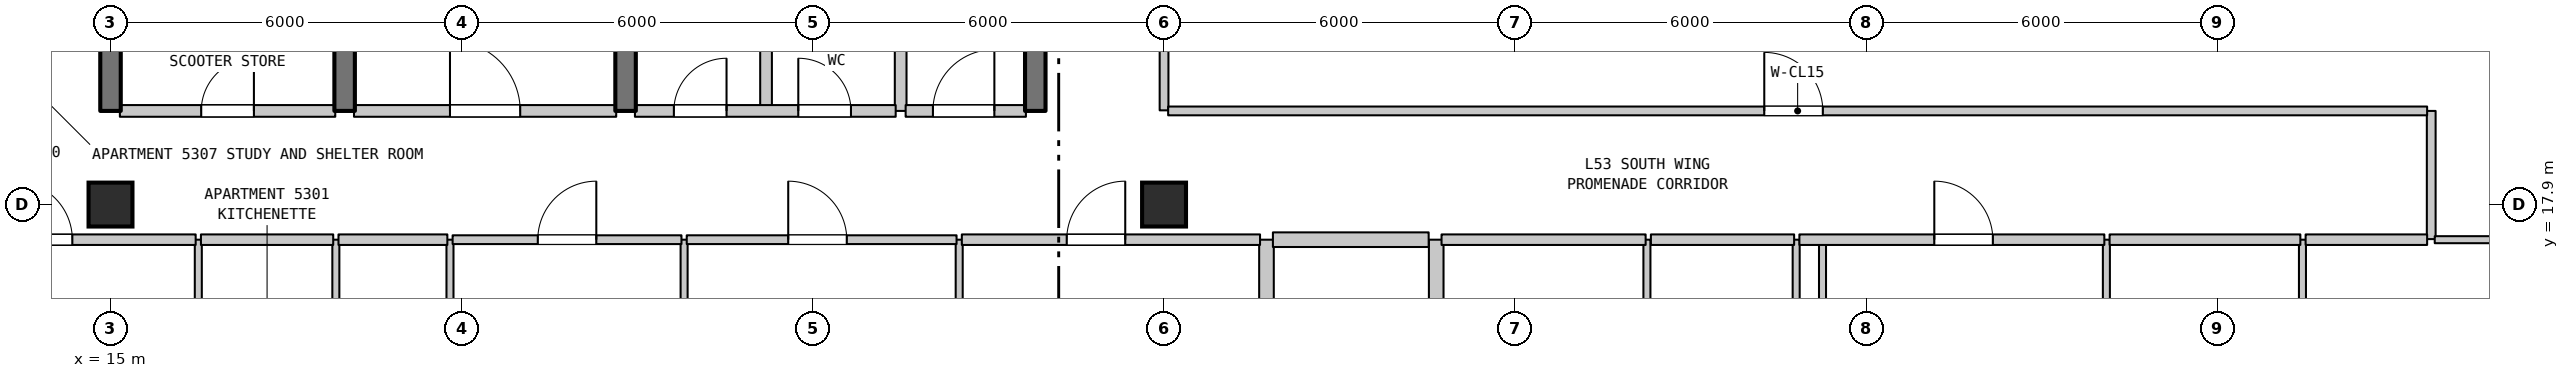
"""IFC4 building model, lengths in metres.
Left out: names, types, materials, properties, quantities, classifications, styles, units other than length and angle.
Written with IfcOpenShell. Run it as: python <this file> out.ifc"""

import sys

from ifc_helpers import new_model, si_unit, direction, frame, frame_2d, origin, origin_2d, place, context, subcontext, project, spatial, rectangle, extrude, element, fill, save


model = new_model("IFC4")
c1 = context("Model", 3, precision=1e-05, world=origin(), true_north=direction((0.0, 1.0)))
c2 = subcontext(c1, "Body", "Model", "MODEL_VIEW")
j1 = project(units=[si_unit("LENGTHUNIT", "METRE"), si_unit("PLANEANGLEUNIT", "RADIAN")], contexts=[c1])
p1 = place(None, origin())
s1 = spatial("IfcSite", under=j1, at=p1, CompositionType="ELEMENT")
p2 = place(p1, origin())
s2 = spatial("IfcBuilding", under=s1, at=p2, CompositionType="ELEMENT")
p3 = place(p2, frame((0.0, 0.0, 214.3)))
s3 = spatial("IfcBuildingStorey", under=s2, at=p3, CompositionType="ELEMENT", Elevation=214.3)
for number, where, z_axis, x_axis in (
    (1, (15.0, 17.9, 0.0), (0.0, 0.0, 1.0), (1.0, 0.0, 0.0)),
    (2, (33.0, 17.9, 0.0), (0.0, 0.0, 1.0), (1.0, 0.0, 0.0)),
):
    element("IfcColumn", number, at=place(p3, frame(where, z_axis=z_axis, x_axis=x_axis)), inside=s3, PredefinedType="COLUMN", context=c2, shape_type="SweptSolid", body=[
        extrude(rectangle(XDim=0.75, YDim=0.75, at=origin_2d()), origin(), (0.0, 0.0, 1.0), 3.7),
    ])
p4 = place(p3, frame((15.0, 19.5, 0.0), z_axis=(0.0, 0.0, 1.0), x_axis=(0.0, 1.0, 0.0)))
e3 = element("IfcWall", 3, at=p4, inside=s3, PredefinedType="SHEAR", context=c2, shape_type="SweptSolid", body=[
    extrude(rectangle(XDim=3.2, YDim=0.35, at=frame_2d((1.6, 0.0))), origin(), (0.0, 0.0, 1.0), 3.38),
])
p5 = place(p3, frame((16.5, 14.1, 0.0), z_axis=(0.0, 0.0, 1.0), x_axis=(0.0, 1.0, 0.0)))
e4 = element("IfcWall", 4, at=p5, inside=s3, PredefinedType="PARTITIONING", context=c2, shape_type="SweptSolid", body=[
    extrude(rectangle(XDim=3.2, YDim=0.12, at=frame_2d((1.6, 0.0))), origin(), (0.0, 0.0, 1.0), 3.38),
])
p6 = place(p5, frame((1.15, 0.0, 0.0)))
e5 = element("IfcOpeningElement", 5, at=p6, cuts=e4, PredefinedType="OPENING", context=c2, shape_type="SweptSolid", body=[
    extrude(rectangle(XDim=0.9, YDim=2.15, at=frame_2d((0.45, 1.075))), frame((0.0, 0.07, 0.0), z_axis=(0.0, -1.0, 0.0), x_axis=(1.0, 0.0, 0.0)), (0.0, 0.0, 1.0), 0.14),
])
p7 = place(p3, frame((18.85, 14.1, 0.0), z_axis=(0.0, 0.0, 1.0), x_axis=(0.0, 1.0, 0.0)))
e6 = element("IfcWall", 6, at=p7, inside=s3, PredefinedType="PARTITIONING", context=c2, shape_type="SweptSolid", body=[
    extrude(rectangle(XDim=3.2, YDim=0.12, at=frame_2d((1.6, 0.0))), origin(), (0.0, 0.0, 1.0), 3.38),
])
p8 = place(p3, frame((19.0, 19.5, 0.0), z_axis=(0.0, 0.0, 1.0), x_axis=(0.0, 1.0, 0.0)))
e7 = element("IfcWall", 7, at=p8, inside=s3, PredefinedType="SHEAR", context=c2, shape_type="SweptSolid", body=[
    extrude(rectangle(XDim=3.2, YDim=0.35, at=frame_2d((1.6, 0.0))), origin(), (0.0, 0.0, 1.0), 3.38),
])
p9 = place(p3, frame((20.8, 6.888, 0.0), z_axis=(0.0, 0.0, 1.0), x_axis=(0.0, 1.0, 0.0)))
e8 = element("IfcWall", 8, at=p9, inside=s3, PredefinedType="PARTITIONING", context=c2, shape_type="SweptSolid", body=[
    extrude(rectangle(XDim=10.412, YDim=0.12, at=frame_2d((5.206, 0.0))), origin(), (0.0, 0.0, 1.0), 3.38),
])
p10 = place(p3, frame((23.8, 19.5, 0.0), z_axis=(0.0, 0.0, 1.0), x_axis=(0.0, 1.0, 0.0)))
e9 = element("IfcWall", 9, at=p10, inside=s3, PredefinedType="SHEAR", context=c2, shape_type="SweptSolid", body=[
    extrude(rectangle(XDim=3.2, YDim=0.35, at=frame_2d((1.6, 0.0))), origin(), (0.0, 0.0, 1.0), 3.38),
])
p11 = place(p3, frame((24.8, 0.71, 0.0), z_axis=(0.0, 0.0, 1.0), x_axis=(0.0, 1.0, 0.0)))
e10 = element("IfcWall", 10, at=p11, inside=s3, PredefinedType="PARTITIONING", context=c2, shape_type="SweptSolid", body=[
    extrude(rectangle(XDim=16.59, YDim=0.12, at=frame_2d((8.295, 0.0))), origin(), (0.0, 0.0, 1.0), 3.38),
])
for number, where, z_axis, x_axis in (
    (11, (26.2, 19.5, 0.0), (0.0, 0.0, 1.0), (0.0, 1.0, 0.0)),
    (12, (28.5, 19.5, 0.0), (0.0, 0.0, 1.0), (0.0, 1.0, 0.0)),
):
    element("IfcWall", number, at=place(p3, frame(where, z_axis=z_axis, x_axis=x_axis)), inside=s3, PredefinedType="STANDARD", context=c2, shape_type="SweptSolid", body=[
        extrude(rectangle(XDim=3.2, YDim=0.2, at=frame_2d((1.6, 0.0))), origin(), (0.0, 0.0, 1.0), 3.38),
    ])
p12 = place(p3, frame((29.5, 14.85, 0.0), z_axis=(0.0, 0.0, 1.0), x_axis=(0.0, 1.0, 0.0)))
e13 = element("IfcWall", 13, at=p12, inside=s3, PredefinedType="PARTITIONING", context=c2, shape_type="SweptSolid", body=[
    extrude(rectangle(XDim=2.45, YDim=0.12, at=frame_2d((1.225, 0.0))), origin(), (0.0, 0.0, 1.0), 3.38),
])
p13 = place(p3, frame((30.8, 19.5, 0.0), z_axis=(0.0, 0.0, 1.0), x_axis=(0.0, 1.0, 0.0)))
e14 = element("IfcWall", 14, at=p13, inside=s3, PredefinedType="SHEAR", context=c2, shape_type="SweptSolid", body=[
    extrude(rectangle(XDim=3.2, YDim=0.35, at=frame_2d((1.6, 0.0))), origin(), (0.0, 0.0, 1.0), 3.38),
])
p14 = place(p3, frame((33.0, 19.51, 0.0), z_axis=(0.0, 0.0, 1.0), x_axis=(0.0, 1.0, 0.0)))
e15 = element("IfcWall", 15, at=p14, inside=s3, PredefinedType="STANDARD", context=c2, shape_type="SweptSolid", body=[
    extrude(rectangle(XDim=3.66, YDim=0.15, at=frame_2d((1.83, 0.0))), origin(), (0.0, 0.0, 1.0), 2.98),
])
p15 = place(p14, frame((1.258, 0.0, 0.0)))
e16 = element("IfcOpeningElement", 16, at=p15, cuts=e15, PredefinedType="OPENING", context=c2, shape_type="SweptSolid", body=[
    extrude(rectangle(XDim=1.0, YDim=2.15, at=frame_2d((0.5, 1.075))), frame((0.0, 0.085, 0.0), z_axis=(0.0, -1.0, 0.0), x_axis=(1.0, 0.0, 0.0)), (0.0, 0.0, 1.0), 0.17),
])
for number, where, z_axis, x_axis in (
    (17, (34.75, 11.15, 0.0), (0.0, 0.0, 1.0), (0.0, 1.0, 0.0)),
    (18, (37.65, 11.15, 0.0), (0.0, 0.0, 1.0), (0.0, 1.0, 0.0)),
):
    element("IfcWall", number, at=place(p3, frame(where, z_axis=z_axis, x_axis=x_axis)), inside=s3, PredefinedType="STANDARD", context=c2, shape_type="SweptSolid", body=[
        extrude(rectangle(XDim=6.15, YDim=0.25, at=frame_2d((3.075, 0.0))), origin(), (0.0, 0.0, 1.0), 3.38),
    ])
for number, where, z_axis, x_axis in (
    (19, (41.25, 11.15, 0.0), (0.0, 0.0, 1.0), (0.0, 1.0, 0.0)),
    (20, (43.8, 11.15, 0.0), (0.0, 0.0, 1.0), (0.0, 1.0, 0.0)),
):
    element("IfcWall", number, at=place(p3, frame(where, z_axis=z_axis, x_axis=x_axis)), inside=s3, PredefinedType="PARTITIONING", context=c2, shape_type="SweptSolid", body=[
        extrude(rectangle(XDim=6.15, YDim=0.12, at=frame_2d((3.075, 0.0))), origin(), (0.0, 0.0, 1.0), 3.38),
    ])
p16 = place(p3, frame((44.25, 14.85, 0.0), z_axis=(0.0, 0.0, 1.0), x_axis=(0.0, 1.0, 0.0)))
e21 = element("IfcWall", 21, at=p16, inside=s3, PredefinedType="PARTITIONING", context=c2, shape_type="SweptSolid", body=[
    extrude(rectangle(XDim=2.45, YDim=0.12, at=frame_2d((1.225, 0.0))), origin(), (0.0, 0.0, 1.0), 3.38),
])
for number, where, z_axis, x_axis in (
    (22, (49.1, 11.15, 0.0), (0.0, 0.0, 1.0), (0.0, 1.0, 0.0)),
    (23, (52.45, 11.15, 0.0), (0.0, 0.0, 1.0), (0.0, 1.0, 0.0)),
):
    element("IfcWall", number, at=place(p3, frame(where, z_axis=z_axis, x_axis=x_axis)), inside=s3, PredefinedType="PARTITIONING", context=c2, shape_type="SweptSolid", body=[
        extrude(rectangle(XDim=6.15, YDim=0.12, at=frame_2d((3.075, 0.0))), origin(), (0.0, 0.0, 1.0), 3.38),
    ])
p17 = place(p3, frame((54.65, 17.31, 0.0), z_axis=(0.0, 0.0, 1.0), x_axis=(0.0, 1.0, 0.0)))
e24 = element("IfcWall", 24, at=p17, inside=s3, PredefinedType="STANDARD", context=c2, shape_type="SweptSolid", body=[
    extrude(rectangle(XDim=2.19, YDim=0.15, at=frame_2d((1.095, 0.0))), origin(), (0.0, 0.0, 1.0), 3.38),
])
p18 = place(p3, frame((12.875, 17.3, 0.0), z_axis=(0.0, 0.0, 1.0), x_axis=(1.0, 0.0, 0.0)))
e25 = element("IfcWall", 25, at=p18, inside=s3, PredefinedType="STANDARD", context=c2, shape_type="SweptSolid", body=[
    extrude(rectangle(XDim=3.58, YDim=0.18, at=frame_2d((1.79, 0.0))), origin(), (0.0, 0.0, 1.0), 3.38),
])
p19 = place(p18, frame((0.473, 0.0, 0.0)))
e26 = element("IfcOpeningElement", 26, at=p19, cuts=e25, PredefinedType="OPENING", context=c2, shape_type="SweptSolid", body=[
    extrude(rectangle(XDim=1.0, YDim=2.15, at=frame_2d((0.5, 1.075))), frame((0.0, 0.1, 0.0), z_axis=(0.0, -1.0, 0.0), x_axis=(1.0, 0.0, 0.0)), (0.0, 0.0, 1.0), 0.2),
])
p20 = place(p3, frame((16.545, 17.3, 0.0), z_axis=(0.0, 0.0, 1.0), x_axis=(1.0, 0.0, 0.0)))
e27 = element("IfcWall", 27, at=p20, inside=s3, PredefinedType="STANDARD", context=c2, shape_type="SweptSolid", body=[
    extrude(rectangle(XDim=2.26, YDim=0.18, at=frame_2d((1.13, 0.0))), origin(), (0.0, 0.0, 1.0), 3.38),
])
p21 = place(p3, frame((18.895, 17.3, 0.0), z_axis=(0.0, 0.0, 1.0), x_axis=(1.0, 0.0, 0.0)))
e28 = element("IfcWall", 28, at=p21, inside=s3, PredefinedType="STANDARD", context=c2, shape_type="SweptSolid", body=[
    extrude(rectangle(XDim=1.86, YDim=0.18, at=frame_2d((0.93, 0.0))), origin(), (0.0, 0.0, 1.0), 3.38),
])
p22 = place(p3, frame((20.845, 17.3, 0.0), z_axis=(0.0, 0.0, 1.0), x_axis=(1.0, 0.0, 0.0)))
e29 = element("IfcWall", 29, at=p22, inside=s3, PredefinedType="STANDARD", context=c2, shape_type="SweptSolid", body=[
    extrude(rectangle(XDim=3.91, YDim=0.15, at=frame_2d((1.955, 0.0))), origin(), (0.0, 0.0, 1.0), 3.38),
])
p23 = place(p22, frame((1.455, 0.0, 0.0)))
e30 = element("IfcOpeningElement", 30, at=p23, cuts=e29, PredefinedType="OPENING", context=c2, shape_type="SweptSolid", body=[
    extrude(rectangle(XDim=1.0, YDim=2.15, at=frame_2d((0.5, 1.075))), frame((0.0, 0.085, 0.0), z_axis=(0.0, -1.0, 0.0), x_axis=(1.0, 0.0, 0.0)), (0.0, 0.0, 1.0), 0.17),
])
p24 = place(p3, frame((24.845, 17.3, 0.0), z_axis=(0.0, 0.0, 1.0), x_axis=(1.0, 0.0, 0.0)))
e31 = element("IfcWall", 31, at=p24, inside=s3, PredefinedType="STANDARD", context=c2, shape_type="SweptSolid", body=[
    extrude(rectangle(XDim=4.61, YDim=0.15, at=frame_2d((2.305, 0.0))), origin(), (0.0, 0.0, 1.0), 3.38),
])
p25 = place(p24, frame((1.734, 0.0, 0.0)))
e32 = element("IfcOpeningElement", 32, at=p25, cuts=e31, PredefinedType="OPENING", context=c2, shape_type="SweptSolid", body=[
    extrude(rectangle(XDim=1.0, YDim=2.15, at=frame_2d((0.5, 1.075))), frame((0.0, 0.085, 0.0), z_axis=(0.0, -1.0, 0.0), x_axis=(1.0, 0.0, 0.0)), (0.0, 0.0, 1.0), 0.17),
])
p26 = place(p3, frame((29.545, 17.3, 0.0), z_axis=(0.0, 0.0, 1.0), x_axis=(1.0, 0.0, 0.0)))
e33 = element("IfcWall", 33, at=p26, inside=s3, PredefinedType="STANDARD", context=c2, shape_type="SweptSolid", body=[
    extrude(rectangle(XDim=5.095, YDim=0.18, at=frame_2d((2.547, 0.0))), origin(), (0.0, 0.0, 1.0), 3.38),
])
p27 = place(p26, frame((1.792, 0.0, 0.0)))
e34 = element("IfcOpeningElement", 34, at=p27, cuts=e33, PredefinedType="OPENING", context=c2, shape_type="SweptSolid", body=[
    extrude(rectangle(XDim=1.0, YDim=2.15, at=frame_2d((0.5, 1.075))), frame((0.0, 0.1, 0.0), z_axis=(0.0, -1.0, 0.0), x_axis=(1.0, 0.0, 0.0)), (0.0, 0.0, 1.0), 0.2),
])
p28 = place(p3, frame((34.86, 17.3, 0.0), z_axis=(0.0, 0.0, 1.0), x_axis=(1.0, 0.0, 0.0)))
e35 = element("IfcWall", 35, at=p28, inside=s3, PredefinedType="STANDARD", context=c2, shape_type="SweptSolid", body=[
    extrude(rectangle(XDim=2.661, YDim=0.25, at=frame_2d((1.331, 0.0))), origin(), (0.0, 0.0, 1.0), 3.38),
])
p29 = place(p3, frame((37.741, 17.3, 0.0), z_axis=(0.0, 0.0, 1.0), x_axis=(1.0, 0.0, 0.0)))
e36 = element("IfcWall", 36, at=p29, inside=s3, PredefinedType="STANDARD", context=c2, shape_type="SweptSolid", body=[
    extrude(rectangle(XDim=3.487, YDim=0.18, at=frame_2d((1.744, 0.0))), origin(), (0.0, 0.0, 1.0), 3.38),
])
p30 = place(p3, frame((41.318, 17.3, 0.0), z_axis=(0.0, 0.0, 1.0), x_axis=(1.0, 0.0, 0.0)))
e37 = element("IfcWall", 37, at=p30, inside=s3, PredefinedType="STANDARD", context=c2, shape_type="SweptSolid", body=[
    extrude(rectangle(XDim=2.447, YDim=0.18, at=frame_2d((1.223, 0.0))), origin(), (0.0, 0.0, 1.0), 3.38),
])
p31 = place(p3, frame((43.855, 17.3, 0.0), z_axis=(0.0, 0.0, 1.0), x_axis=(1.0, 0.0, 0.0)))
e38 = element("IfcWall", 38, at=p31, inside=s3, PredefinedType="STANDARD", context=c2, shape_type="SweptSolid", body=[
    extrude(rectangle(XDim=5.21, YDim=0.18, at=frame_2d((2.605, 0.0))), origin(), (0.0, 0.0, 1.0), 3.38),
])
p32 = place(p31, frame((2.305, 0.0, 0.0)))
e39 = element("IfcOpeningElement", 39, at=p32, cuts=e38, PredefinedType="OPENING", context=c2, shape_type="SweptSolid", body=[
    extrude(rectangle(XDim=1.0, YDim=2.15, at=frame_2d((0.5, 1.075))), frame((0.0, 0.1, 0.0), z_axis=(0.0, -1.0, 0.0), x_axis=(1.0, 0.0, 0.0)), (0.0, 0.0, 1.0), 0.2),
])
p33 = place(p3, frame((49.155, 17.3, 0.0), z_axis=(0.0, 0.0, 1.0), x_axis=(1.0, 0.0, 0.0)))
e40 = element("IfcWall", 40, at=p33, inside=s3, PredefinedType="STANDARD", context=c2, shape_type="SweptSolid", body=[
    extrude(rectangle(XDim=3.259, YDim=0.18, at=frame_2d((1.629, 0.0))), origin(), (0.0, 0.0, 1.0), 3.38),
])
p34 = place(p3, frame((52.504, 17.3, 0.0), z_axis=(0.0, 0.0, 1.0), x_axis=(1.0, 0.0, 0.0)))
e41 = element("IfcWall", 41, at=p34, inside=s3, PredefinedType="STANDARD", context=c2, shape_type="SweptSolid", body=[
    extrude(rectangle(XDim=2.076, YDim=0.18, at=frame_2d((1.038, 0.0))), origin(), (0.0, 0.0, 1.0), 3.38),
])
p35 = place(p3, frame((54.71, 17.3, 0.0), z_axis=(0.0, 0.0, 1.0), x_axis=(1.0, 0.0, 0.0)))
e42 = element("IfcWall", 42, at=p35, inside=s3, PredefinedType="PARTITIONING", context=c2, shape_type="SweptSolid", body=[
    extrude(rectangle(XDim=1.635, YDim=0.12, at=frame_2d((0.817, 0.0))), origin(), (0.0, 0.0, 1.0), 3.38),
])
p36 = place(p3, frame((15.16, 19.5, 0.0), z_axis=(0.0, 0.0, 1.0), x_axis=(1.0, 0.0, 0.0)))
e43 = element("IfcWall", 43, at=p36, inside=s3, PredefinedType="STANDARD", context=c2, shape_type="SweptSolid", body=[
    extrude(rectangle(XDim=3.68, YDim=0.2, at=frame_2d((1.84, 0.0))), origin(), (0.0, 0.0, 1.0), 3.38),
])
p37 = place(p36, frame((1.39, 0.0, 0.0)))
e44 = element("IfcOpeningElement", 44, at=p37, cuts=e43, PredefinedType="OPENING", context=c2, shape_type="SweptSolid", body=[
    extrude(rectangle(XDim=0.9, YDim=2.15, at=frame_2d((0.45, 1.075))), frame((0.0, 0.11, 0.0), z_axis=(0.0, -1.0, 0.0), x_axis=(1.0, 0.0, 0.0)), (0.0, 0.0, 1.0), 0.22),
])
p38 = place(p3, frame((19.16, 19.5, 0.0), z_axis=(0.0, 0.0, 1.0), x_axis=(1.0, 0.0, 0.0)))
e45 = element("IfcWall", 45, at=p38, inside=s3, PredefinedType="STANDARD", context=c2, shape_type="SweptSolid", body=[
    extrude(rectangle(XDim=4.48, YDim=0.2, at=frame_2d((2.24, 0.0))), origin(), (0.0, 0.0, 1.0), 3.38),
])
p39 = place(p38, frame((1.64, 0.0, 0.0)))
e46 = element("IfcOpeningElement", 46, at=p39, cuts=e45, PredefinedType="OPENING", context=c2, shape_type="SweptSolid", body=[
    extrude(rectangle(XDim=1.2, YDim=2.2, at=frame_2d((0.6, 1.1))), frame((0.0, 0.11, 0.0), z_axis=(0.0, -1.0, 0.0), x_axis=(1.0, 0.0, 0.0)), (0.0, 0.0, 1.0), 0.22),
])
p40 = place(p3, frame((23.96, 19.5, 0.0), z_axis=(0.0, 0.0, 1.0), x_axis=(1.0, 0.0, 0.0)))
e47 = element("IfcWall", 47, at=p40, inside=s3, PredefinedType="STANDARD", context=c2, shape_type="SweptSolid", body=[
    extrude(rectangle(XDim=4.455, YDim=0.2, at=frame_2d((2.228, 0.0))), origin(), (0.0, 0.0, 1.0), 3.38),
])
p41 = place(p40, frame((0.665, 0.0, 0.0)))
e48 = element("IfcOpeningElement", 48, at=p41, cuts=e47, PredefinedType="OPENING", context=c2, shape_type="SweptSolid", body=[
    extrude(rectangle(XDim=0.9, YDim=2.15, at=frame_2d((0.45, 1.075))), frame((0.0, 0.11, 0.0), z_axis=(0.0, -1.0, 0.0), x_axis=(1.0, 0.0, 0.0)), (0.0, 0.0, 1.0), 0.22),
])
p42 = place(p40, frame((2.791, 0.0, 0.0)))
e49 = element("IfcOpeningElement", 49, at=p42, cuts=e47, PredefinedType="OPENING", context=c2, shape_type="SweptSolid", body=[
    extrude(rectangle(XDim=0.9, YDim=2.15, at=frame_2d((0.45, 1.075))), frame((0.0, 0.11, 0.0), z_axis=(0.0, -1.0, 0.0), x_axis=(1.0, 0.0, 0.0)), (0.0, 0.0, 1.0), 0.22),
])
p43 = place(p3, frame((28.585, 19.5, 0.0), z_axis=(0.0, 0.0, 1.0), x_axis=(1.0, 0.0, 0.0)))
e50 = element("IfcWall", 50, at=p43, inside=s3, PredefinedType="STANDARD", context=c2, shape_type="SweptSolid", body=[
    extrude(rectangle(XDim=2.055, YDim=0.2, at=frame_2d((1.027, 0.0))), origin(), (0.0, 0.0, 1.0), 3.38),
])
p44 = place(p43, frame((0.466, 0.0, 0.0)))
e51 = element("IfcOpeningElement", 51, at=p44, cuts=e50, PredefinedType="OPENING", context=c2, shape_type="SweptSolid", body=[
    extrude(rectangle(XDim=1.05, YDim=2.15, at=frame_2d((0.525, 1.075))), frame((0.0, 0.11, 0.0), z_axis=(0.0, -1.0, 0.0), x_axis=(1.0, 0.0, 0.0)), (0.0, 0.0, 1.0), 0.22),
])
p45 = place(p3, frame((33.07, 19.5, 0.0), z_axis=(0.0, 0.0, 1.0), x_axis=(1.0, 0.0, 0.0)))
e52 = element("IfcWall", 52, at=p45, inside=s3, PredefinedType="STANDARD", context=c2, shape_type="SweptSolid", body=[
    extrude(rectangle(XDim=21.51, YDim=0.15, at=frame_2d((10.755, 0.0))), origin(), (0.0, 0.0, 1.0), 3.38),
])
p46 = place(p45, frame((10.185, 0.0, 0.0)))
e53 = element("IfcOpeningElement", 53, at=p46, cuts=e52, PredefinedType="OPENING", context=c2, shape_type="SweptSolid", body=[
    extrude(rectangle(XDim=1.0, YDim=2.15, at=frame_2d((0.5, 1.075))), frame((0.0, 0.085, 0.0), z_axis=(0.0, -1.0, 0.0), x_axis=(1.0, 0.0, 0.0)), (0.0, 0.0, 1.0), 0.17),
])
p47 = place(p19, origin())
e54 = element("IfcDoor", 54, at=p47, inside=s3, OperationType="SINGLE_SWING_LEFT", PredefinedType="DOOR", context=c2, shape_type="SweptSolid", body=[
    extrude(rectangle(XDim=1.0, YDim=2.15, at=frame_2d((0.5, 1.075))), frame((0.0, 0.025, 0.0), z_axis=(0.0, -1.0, 0.0), x_axis=(1.0, 0.0, 0.0)), (0.0, 0.0, 1.0), 0.05),
])
fill(e26, e54)
p48 = place(p23, origin())
e55 = element("IfcDoor", 55, at=p48, inside=s3, OperationType="SINGLE_SWING_RIGHT", PredefinedType="DOOR", context=c2, shape_type="SweptSolid", body=[
    extrude(rectangle(XDim=1.0, YDim=2.15, at=frame_2d((0.5, 1.075))), frame((0.0, 0.025, 0.0), z_axis=(0.0, -1.0, 0.0), x_axis=(1.0, 0.0, 0.0)), (0.0, 0.0, 1.0), 0.05),
])
fill(e30, e55)
p49 = place(p25, origin())
e56 = element("IfcDoor", 56, at=p49, inside=s3, OperationType="SINGLE_SWING_LEFT", PredefinedType="DOOR", context=c2, shape_type="SweptSolid", body=[
    extrude(rectangle(XDim=1.0, YDim=2.15, at=frame_2d((0.5, 1.075))), frame((0.0, 0.025, 0.0), z_axis=(0.0, -1.0, 0.0), x_axis=(1.0, 0.0, 0.0)), (0.0, 0.0, 1.0), 0.05),
])
fill(e32, e56)
p50 = place(p27, origin())
e57 = element("IfcDoor", 57, at=p50, inside=s3, OperationType="SINGLE_SWING_RIGHT", PredefinedType="DOOR", context=c2, shape_type="SweptSolid", body=[
    extrude(rectangle(XDim=1.0, YDim=2.15, at=frame_2d((0.5, 1.075))), frame((0.0, 0.025, 0.0), z_axis=(0.0, -1.0, 0.0), x_axis=(1.0, 0.0, 0.0)), (0.0, 0.0, 1.0), 0.05),
])
fill(e34, e57)
p51 = place(p32, origin())
e58 = element("IfcDoor", 58, at=p51, inside=s3, OperationType="SINGLE_SWING_LEFT", PredefinedType="DOOR", context=c2, shape_type="SweptSolid", body=[
    extrude(rectangle(XDim=1.0, YDim=2.15, at=frame_2d((0.5, 1.075))), frame((0.0, 0.025, 0.0), z_axis=(0.0, -1.0, 0.0), x_axis=(1.0, 0.0, 0.0)), (0.0, 0.0, 1.0), 0.05),
])
fill(e39, e58)
p52 = place(p37, origin())
e59 = element("IfcDoor", 59, at=p52, inside=s3, OperationType="SINGLE_SWING_RIGHT", PredefinedType="DOOR", context=c2, shape_type="SweptSolid", body=[
    extrude(rectangle(XDim=0.9, YDim=2.15, at=frame_2d((0.45, 1.075))), frame((0.0, 0.025, 0.0), z_axis=(0.0, -1.0, 0.0), x_axis=(1.0, 0.0, 0.0)), (0.0, 0.0, 1.0), 0.05),
])
fill(e44, e59)
p53 = place(p39, origin())
e60 = element("IfcDoor", 60, at=p53, inside=s3, OperationType="SINGLE_SWING_LEFT", PredefinedType="DOOR", context=c2, shape_type="SweptSolid", body=[
    extrude(rectangle(XDim=1.2, YDim=2.2, at=frame_2d((0.6, 1.1))), frame((0.0, 0.025, 0.0), z_axis=(0.0, -1.0, 0.0), x_axis=(1.0, 0.0, 0.0)), (0.0, 0.0, 1.0), 0.05),
])
fill(e46, e60)
p54 = place(p41, origin())
e61 = element("IfcDoor", 61, at=p54, inside=s3, OperationType="SINGLE_SWING_RIGHT", PredefinedType="DOOR", context=c2, shape_type="SweptSolid", body=[
    extrude(rectangle(XDim=0.9, YDim=2.15, at=frame_2d((0.45, 1.075))), frame((0.0, 0.025, 0.0), z_axis=(0.0, -1.0, 0.0), x_axis=(1.0, 0.0, 0.0)), (0.0, 0.0, 1.0), 0.05),
])
fill(e48, e61)
p55 = place(p42, origin())
e62 = element("IfcDoor", 62, at=p55, inside=s3, OperationType="SINGLE_SWING_LEFT", PredefinedType="DOOR", context=c2, shape_type="SweptSolid", body=[
    extrude(rectangle(XDim=0.9, YDim=2.15, at=frame_2d((0.45, 1.075))), frame((0.0, 0.025, 0.0), z_axis=(0.0, -1.0, 0.0), x_axis=(1.0, 0.0, 0.0)), (0.0, 0.0, 1.0), 0.05),
])
fill(e49, e62)
p56 = place(p44, origin())
e63 = element("IfcDoor", 63, at=p56, inside=s3, OperationType="SINGLE_SWING_RIGHT", PredefinedType="DOOR", context=c2, shape_type="SweptSolid", body=[
    extrude(rectangle(XDim=1.05, YDim=2.15, at=frame_2d((0.525, 1.075))), frame((0.0, 0.025, 0.0), z_axis=(0.0, -1.0, 0.0), x_axis=(1.0, 0.0, 0.0)), (0.0, 0.0, 1.0), 0.05),
])
fill(e51, e63)
p57 = place(p46, origin())
e64 = element("IfcDoor", 64, at=p57, inside=s3, OperationType="SINGLE_SWING_LEFT", PredefinedType="DOOR", context=c2, shape_type="SweptSolid", body=[
    extrude(rectangle(XDim=1.0, YDim=2.15, at=frame_2d((0.5, 1.075))), frame((0.0, 0.025, 0.0), z_axis=(0.0, -1.0, 0.0), x_axis=(1.0, 0.0, 0.0)), (0.0, 0.0, 1.0), 0.05),
])
fill(e53, e64)
save(model, sys.argv[1])
